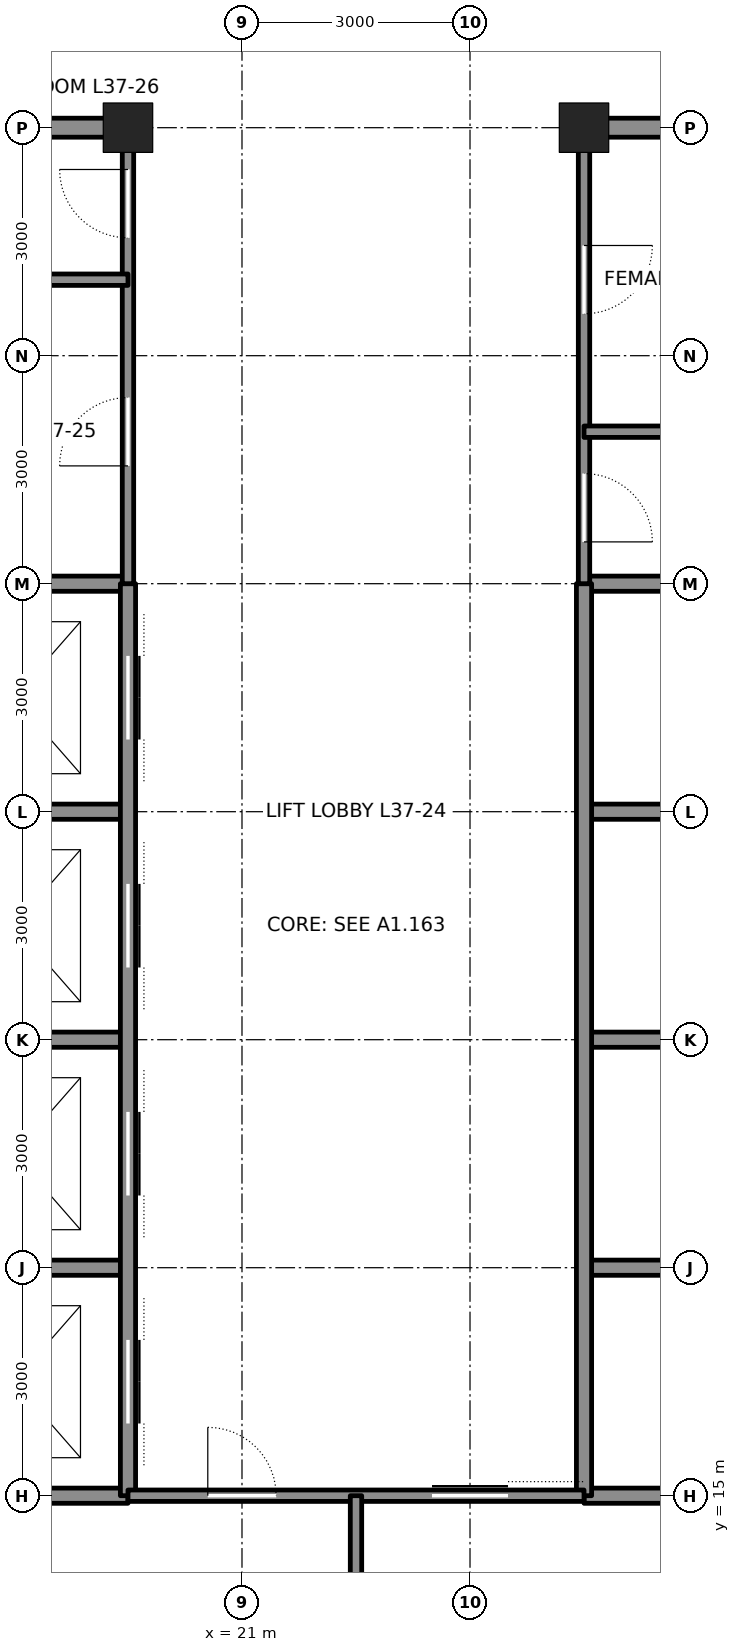
"""IFC4 building model, lengths in metres.
Left out: names, types, materials, properties, quantities, classifications, styles, units other than length and angle.
Written with IfcOpenShell. Run it as: python <this file> out.ifc"""

import sys

from ifc_helpers import new_model, si_unit, direction, frame, frame_2d, origin, origin_2d, place, context, subcontext, project, spatial, rectangle, hollow_rectangle, extrude, element, fill, save


model = new_model("IFC4")
c1 = context("Model", 3, precision=1e-05, world=origin(), true_north=direction((0.0, 1.0)))
c2 = subcontext(c1, "Body", "Model", "MODEL_VIEW")
j1 = project(units=[si_unit("LENGTHUNIT", "METRE"), si_unit("PLANEANGLEUNIT", "RADIAN")], contexts=[c1])
p1 = place(None, origin())
s1 = spatial("IfcSite", under=j1, at=p1, CompositionType="ELEMENT")
p2 = place(p1, origin())
s2 = spatial("IfcBuilding", under=s1, at=p2, CompositionType="ELEMENT")
p3 = place(p2, frame((0.0, 0.0, 169.8)))
s3 = spatial("IfcBuildingStorey", under=s2, at=p3, CompositionType="ELEMENT", Elevation=169.8)
for number, where, z_axis, x_axis in (
    (1, (19.5, 33.0, 0.0), (0.0, 0.0, 1.0), (1.0, 0.0, 0.0)),
    (2, (25.5, 33.0, 0.0), (0.0, 0.0, 1.0), (1.0, 0.0, 0.0)),
):
    element("IfcColumn", number, at=place(p3, frame(where, z_axis=z_axis, x_axis=x_axis)), inside=s3, PredefinedType="COLUMN", context=c2, shape_type="SweptSolid", body=[
        extrude(hollow_rectangle(XDim=0.65, YDim=0.65, WallThickness=0.065, at=origin_2d()), origin(), (0.0, 0.0, 1.0), 4.2),
    ])
for number, where, z_axis, x_axis in (
    (3, (12.0, 15.0, 0.0), (0.0, 0.0, 1.0), (1.0, 0.0, 0.0)),
    (4, (25.5, 15.0, 0.0), (0.0, 0.0, 1.0), (1.0, 0.0, 0.0)),
):
    element("IfcWall", number, at=place(p3, frame(where, z_axis=z_axis, x_axis=x_axis)), inside=s3, PredefinedType="SOLIDWALL", context=c2, shape_type="SweptSolid", body=[
        extrude(rectangle(XDim=7.5, YDim=0.2, at=frame_2d((3.75, 0.0))), origin(), (0.0, 0.0, 1.0), 4.04),
    ])
for number, where, z_axis, x_axis in (
    (5, (16.75, 24.0, 0.0), (0.0, 0.0, 1.0), (1.0, 0.0, 0.0)),
    (6, (25.5, 24.0, 0.0), (0.0, 0.0, 1.0), (1.0, 0.0, 0.0)),
):
    element("IfcWall", number, at=place(p3, frame(where, z_axis=z_axis, x_axis=x_axis)), inside=s3, PredefinedType="SOLIDWALL", context=c2, shape_type="SweptSolid", body=[
        extrude(rectangle(XDim=2.75, YDim=0.2, at=frame_2d((1.375, 0.0))), origin(), (0.0, 0.0, 1.0), 3.09),
    ])
p4 = place(p3, frame((12.0, 27.0, 0.0), z_axis=(0.0, 0.0, 1.0), x_axis=(1.0, 0.0, 0.0)))
e7 = element("IfcWall", 7, at=p4, inside=s3, PredefinedType="SOLIDWALL", context=c2, shape_type="SweptSolid", body=[
    extrude(rectangle(XDim=7.5, YDim=0.2, at=frame_2d((3.75, 0.0))), origin(), (0.0, 0.0, 1.0), 4.04),
])
p5 = place(p4, frame((1.65, 0.0, 0.0)))
e8 = element("IfcOpeningElement", 8, at=p5, cuts=e7, PredefinedType="OPENING", context=c2, shape_type="SweptSolid", body=[
    extrude(rectangle(XDim=1.2, YDim=2.1, at=frame_2d((0.6, 1.05))), frame((0.0, 0.11, 0.0), z_axis=(0.0, -1.0, 0.0), x_axis=(1.0, 0.0, 0.0)), (0.0, 0.0, 1.0), 0.22),
])
p6 = place(p3, frame((25.5, 27.0, 0.0), z_axis=(0.0, 0.0, 1.0), x_axis=(1.0, 0.0, 0.0)))
e9 = element("IfcWall", 9, at=p6, inside=s3, PredefinedType="SOLIDWALL", context=c2, shape_type="SweptSolid", body=[
    extrude(rectangle(XDim=3.0, YDim=0.2, at=frame_2d((1.5, 0.0))), origin(), (0.0, 0.0, 1.0), 4.04),
])
for number, where, z_axis, x_axis in (
    (10, (16.75, 33.0, 0.0), (0.0, 0.0, 1.0), (1.0, 0.0, 0.0)),
    (11, (25.75, 33.0, 0.0), (0.0, 0.0, 1.0), (1.0, 0.0, 0.0)),
):
    element("IfcWall", number, at=place(p3, frame(where, z_axis=z_axis, x_axis=x_axis)), inside=s3, PredefinedType="SOLIDWALL", context=c2, shape_type="SweptSolid", body=[
        extrude(rectangle(XDim=2.5, YDim=0.25, at=frame_2d((1.25, 0.0))), origin(), (0.0, 0.0, 1.0), 3.181),
    ])
p7 = place(p3, frame((16.5, 18.0, 0.0), z_axis=(0.0, 0.0, 1.0), x_axis=(1.0, 0.0, 0.0)))
e12 = element("IfcWall", 12, at=p7, inside=s3, PredefinedType="SOLIDWALL", context=c2, shape_type="SweptSolid", body=[
    extrude(rectangle(XDim=3.0, YDim=0.2, at=frame_2d((1.5, 0.0))), origin(), (0.0, 0.0, 1.0), 4.04),
])
p8 = place(p3, frame((25.5, 18.0, 0.0), z_axis=(0.0, 0.0, 1.0), x_axis=(1.0, 0.0, 0.0)))
e13 = element("IfcWall", 13, at=p8, inside=s3, PredefinedType="SOLIDWALL", context=c2, shape_type="SweptSolid", body=[
    extrude(rectangle(XDim=7.5, YDim=0.2, at=frame_2d((3.75, 0.0))), origin(), (0.0, 0.0, 1.0), 4.04),
])
p9 = place(p8, frame((4.65, 0.0, 0.0)))
e14 = element("IfcOpeningElement", 14, at=p9, cuts=e13, PredefinedType="OPENING", context=c2, shape_type="SweptSolid", body=[
    extrude(rectangle(XDim=1.2, YDim=2.1, at=frame_2d((0.6, 1.05))), frame((0.0, 0.11, 0.0), z_axis=(0.0, -1.0, 0.0), x_axis=(1.0, 0.0, 0.0)), (0.0, 0.0, 1.0), 0.22),
])
for number, where, z_axis, x_axis in (
    (15, (16.75, 21.0, 0.0), (0.0, 0.0, 1.0), (1.0, 0.0, 0.0)),
    (16, (25.5, 21.0, 0.0), (0.0, 0.0, 1.0), (1.0, 0.0, 0.0)),
):
    element("IfcWall", number, at=place(p3, frame(where, z_axis=z_axis, x_axis=x_axis)), inside=s3, PredefinedType="SOLIDWALL", context=c2, shape_type="SweptSolid", body=[
        extrude(rectangle(XDim=2.75, YDim=0.2, at=frame_2d((1.375, 0.0))), origin(), (0.0, 0.0, 1.0), 3.09),
    ])
p10 = place(p3, frame((19.5, 15.0, 0.0), z_axis=(0.0, 0.0, 1.0), x_axis=(0.0, 1.0, 0.0)))
e17 = element("IfcWall", 17, at=p10, inside=s3, PredefinedType="SOLIDWALL", context=c2, shape_type="SweptSolid", body=[
    extrude(rectangle(XDim=12.0, YDim=0.2, at=frame_2d((6.0, 0.0))), origin(), (0.0, 0.0, 1.0), 3.064),
])
p11 = place(p10, frame((0.95, 0.0, 0.0)))
e18 = element("IfcOpeningElement", 18, at=p11, cuts=e17, PredefinedType="OPENING", context=c2, shape_type="SweptSolid", body=[
    extrude(rectangle(XDim=1.1, YDim=2.1, at=frame_2d((0.55, 1.05))), frame((0.0, 0.11, 0.0), z_axis=(0.0, -1.0, 0.0), x_axis=(1.0, 0.0, 0.0)), (0.0, 0.0, 1.0), 0.22),
])
p12 = place(p10, frame((3.95, 0.0, 0.0)))
e19 = element("IfcOpeningElement", 19, at=p12, cuts=e17, PredefinedType="OPENING", context=c2, shape_type="SweptSolid", body=[
    extrude(rectangle(XDim=1.1, YDim=2.1, at=frame_2d((0.55, 1.05))), frame((0.0, 0.11, 0.0), z_axis=(0.0, -1.0, 0.0), x_axis=(1.0, 0.0, 0.0)), (0.0, 0.0, 1.0), 0.22),
])
p13 = place(p10, frame((6.95, 0.0, 0.0)))
e20 = element("IfcOpeningElement", 20, at=p13, cuts=e17, PredefinedType="OPENING", context=c2, shape_type="SweptSolid", body=[
    extrude(rectangle(XDim=1.1, YDim=2.1, at=frame_2d((0.55, 1.05))), frame((0.0, 0.11, 0.0), z_axis=(0.0, -1.0, 0.0), x_axis=(1.0, 0.0, 0.0)), (0.0, 0.0, 1.0), 0.22),
])
p14 = place(p10, frame((9.95, 0.0, 0.0)))
e21 = element("IfcOpeningElement", 21, at=p14, cuts=e17, PredefinedType="OPENING", context=c2, shape_type="SweptSolid", body=[
    extrude(rectangle(XDim=1.1, YDim=2.1, at=frame_2d((0.55, 1.05))), frame((0.0, 0.11, 0.0), z_axis=(0.0, -1.0, 0.0), x_axis=(1.0, 0.0, 0.0)), (0.0, 0.0, 1.0), 0.22),
])
p15 = place(p3, frame((19.5, 27.0, 0.0), z_axis=(0.0, 0.0, 1.0), x_axis=(0.0, 1.0, 0.0)))
e22 = element("IfcWall", 22, at=p15, inside=s3, PredefinedType="PARTITIONING", context=c2, shape_type="SweptSolid", body=[
    extrude(rectangle(XDim=5.75, YDim=0.15, at=frame_2d((2.875, 0.0))), origin(), (0.0, 0.0, 1.0), 3.064),
])
p16 = place(p15, frame((1.55, 0.0, 0.0)))
e23 = element("IfcOpeningElement", 23, at=p16, cuts=e22, PredefinedType="OPENING", context=c2, shape_type="SweptSolid", body=[
    extrude(rectangle(XDim=0.9, YDim=2.1, at=frame_2d((0.45, 1.05))), frame((0.0, 0.085, 0.0), z_axis=(0.0, -1.0, 0.0), x_axis=(1.0, 0.0, 0.0)), (0.0, 0.0, 1.0), 0.17),
])
p17 = place(p15, frame((4.55, 0.0, 0.0)))
e24 = element("IfcOpeningElement", 24, at=p17, cuts=e22, PredefinedType="OPENING", context=c2, shape_type="SweptSolid", body=[
    extrude(rectangle(XDim=0.9, YDim=2.1, at=frame_2d((0.45, 1.05))), frame((0.0, 0.085, 0.0), z_axis=(0.0, -1.0, 0.0), x_axis=(1.0, 0.0, 0.0)), (0.0, 0.0, 1.0), 0.17),
])
p18 = place(p3, frame((25.5, 15.0, 0.0), z_axis=(0.0, 0.0, 1.0), x_axis=(0.0, 1.0, 0.0)))
e25 = element("IfcWall", 25, at=p18, inside=s3, PredefinedType="SOLIDWALL", context=c2, shape_type="SweptSolid", body=[
    extrude(rectangle(XDim=12.0, YDim=0.2, at=frame_2d((6.0, 0.0))), origin(), (0.0, 0.0, 1.0), 3.064),
])
p19 = place(p3, frame((25.5, 27.0, 0.0), z_axis=(0.0, 0.0, 1.0), x_axis=(0.0, 1.0, 0.0)))
e26 = element("IfcWall", 26, at=p19, inside=s3, PredefinedType="PARTITIONING", context=c2, shape_type="SweptSolid", body=[
    extrude(rectangle(XDim=5.75, YDim=0.15, at=frame_2d((2.875, 0.0))), origin(), (0.0, 0.0, 1.0), 3.064),
])
p20 = place(p19, frame((0.55, 0.0, 0.0)))
e27 = element("IfcOpeningElement", 27, at=p20, cuts=e26, PredefinedType="OPENING", context=c2, shape_type="SweptSolid", body=[
    extrude(rectangle(XDim=0.9, YDim=2.1, at=frame_2d((0.45, 1.05))), frame((0.0, 0.085, 0.0), z_axis=(0.0, -1.0, 0.0), x_axis=(1.0, 0.0, 0.0)), (0.0, 0.0, 1.0), 0.17),
])
p21 = place(p19, frame((3.55, 0.0, 0.0)))
e28 = element("IfcOpeningElement", 28, at=p21, cuts=e26, PredefinedType="OPENING", context=c2, shape_type="SweptSolid", body=[
    extrude(rectangle(XDim=0.9, YDim=2.1, at=frame_2d((0.45, 1.05))), frame((0.0, 0.085, 0.0), z_axis=(0.0, -1.0, 0.0), x_axis=(1.0, 0.0, 0.0)), (0.0, 0.0, 1.0), 0.17),
])
p22 = place(p3, frame((19.5, 15.0, 0.0), z_axis=(0.0, 0.0, 1.0), x_axis=(1.0, 0.0, 0.0)))
e29 = element("IfcWall", 29, at=p22, inside=s3, PredefinedType="PARTITIONING", context=c2, shape_type="SweptSolid", body=[
    extrude(rectangle(XDim=6.0, YDim=0.15, at=frame_2d((3.0, 0.0))), origin(), (0.0, 0.0, 1.0), 4.04),
])
p23 = place(p22, frame((4.0, 0.0, 0.0)))
e30 = element("IfcOpeningElement", 30, at=p23, cuts=e29, PredefinedType="OPENING", context=c2, shape_type="SweptSolid", body=[
    extrude(rectangle(XDim=1.0, YDim=2.1, at=frame_2d((0.5, 1.05))), frame((0.0, 0.085, 0.0), z_axis=(0.0, -1.0, 0.0), x_axis=(1.0, 0.0, 0.0)), (0.0, 0.0, 1.0), 0.17),
])
p24 = place(p22, frame((1.05, 0.0, 0.0)))
e31 = element("IfcOpeningElement", 31, at=p24, cuts=e29, PredefinedType="OPENING", context=c2, shape_type="SweptSolid", body=[
    extrude(rectangle(XDim=0.9, YDim=2.1, at=frame_2d((0.45, 1.05))), frame((0.0, 0.085, 0.0), z_axis=(0.0, -1.0, 0.0), x_axis=(1.0, 0.0, 0.0)), (0.0, 0.0, 1.0), 0.17),
])
for number, where, z_axis, x_axis in (
    (32, (22.5, 15.0, 0.0), (0.0, 0.0, 1.0), (0.0, -1.0, 0.0)),
    (33, (16.5, 31.0, 0.0), (0.0, 0.0, 1.0), (1.0, 0.0, 0.0)),
    (34, (25.5, 29.0, 0.0), (0.0, 0.0, 1.0), (1.0, 0.0, 0.0)),
):
    element("IfcWall", number, at=place(p3, frame(where, z_axis=z_axis, x_axis=x_axis)), inside=s3, PredefinedType="PARTITIONING", context=c2, shape_type="SweptSolid", body=[
        extrude(rectangle(XDim=3.0, YDim=0.15, at=frame_2d((1.5, 0.0))), origin(), (0.0, 0.0, 1.0), 4.04),
    ])
p25 = place(p16, origin())
e35 = element("IfcDoor", 35, at=p25, inside=s3, OperationType="SINGLE_SWING_LEFT", PredefinedType="DOOR", context=c2, shape_type="SweptSolid", body=[
    extrude(rectangle(XDim=0.9, YDim=2.1, at=frame_2d((0.45, 1.05))), frame((0.0, 0.025, 0.0), z_axis=(0.0, -1.0, 0.0), x_axis=(1.0, 0.0, 0.0)), (0.0, 0.0, 1.0), 0.05),
])
fill(e23, e35)
p26 = place(p17, origin())
e36 = element("IfcDoor", 36, at=p26, inside=s3, OperationType="SINGLE_SWING_RIGHT", PredefinedType="DOOR", context=c2, shape_type="SweptSolid", body=[
    extrude(rectangle(XDim=0.9, YDim=2.1, at=frame_2d((0.45, 1.05))), frame((0.0, 0.025, 0.0), z_axis=(0.0, -1.0, 0.0), x_axis=(1.0, 0.0, 0.0)), (0.0, 0.0, 1.0), 0.05),
])
fill(e24, e36)
p27 = place(p20, frame((0.9, 0.0, 0.0), z_axis=(0.0, 0.0, 1.0), x_axis=(-1.0, 0.0, 0.0)))
e37 = element("IfcDoor", 37, at=p27, inside=s3, OperationType="SINGLE_SWING_RIGHT", PredefinedType="DOOR", context=c2, shape_type="SweptSolid", body=[
    extrude(rectangle(XDim=0.9, YDim=2.1, at=frame_2d((0.45, 1.05))), frame((0.0, 0.025, 0.0), z_axis=(0.0, -1.0, 0.0), x_axis=(1.0, 0.0, 0.0)), (0.0, 0.0, 1.0), 0.05),
])
fill(e27, e37)
p28 = place(p21, frame((0.9, 0.0, 0.0), z_axis=(0.0, 0.0, 1.0), x_axis=(-1.0, 0.0, 0.0)))
e38 = element("IfcDoor", 38, at=p28, inside=s3, OperationType="SINGLE_SWING_LEFT", PredefinedType="DOOR", context=c2, shape_type="SweptSolid", body=[
    extrude(rectangle(XDim=0.9, YDim=2.1, at=frame_2d((0.45, 1.05))), frame((0.0, 0.025, 0.0), z_axis=(0.0, -1.0, 0.0), x_axis=(1.0, 0.0, 0.0)), (0.0, 0.0, 1.0), 0.05),
])
fill(e28, e38)
p29 = place(p23, origin())
e39 = element("IfcDoor", 39, at=p29, inside=s3, OperationType="SLIDING_TO_LEFT", PredefinedType="DOOR", context=c2, shape_type="SweptSolid", body=[
    extrude(rectangle(XDim=1.0, YDim=2.1, at=frame_2d((0.5, 1.05))), frame((0.0, 0.025, 0.0), z_axis=(0.0, -1.0, 0.0), x_axis=(1.0, 0.0, 0.0)), (0.0, 0.0, 1.0), 0.05),
])
fill(e30, e39)
p30 = place(p24, origin())
e40 = element("IfcDoor", 40, at=p30, inside=s3, OperationType="SINGLE_SWING_LEFT", PredefinedType="DOOR", context=c2, shape_type="SweptSolid", body=[
    extrude(rectangle(XDim=0.9, YDim=2.1, at=frame_2d((0.45, 1.05))), frame((0.0, 0.025, 0.0), z_axis=(0.0, -1.0, 0.0), x_axis=(1.0, 0.0, 0.0)), (0.0, 0.0, 1.0), 0.05),
])
fill(e31, e40)
p31 = place(p11, origin())
e41 = element("IfcDoor", 41, at=p31, inside=s3, OperationType="DOUBLE_DOOR_SLIDING", PredefinedType="DOOR", context=c2, shape_type="SweptSolid", body=[
    extrude(rectangle(XDim=1.1, YDim=2.1, at=frame_2d((0.55, 1.05))), frame((0.0, 0.025, 0.0), z_axis=(0.0, -1.0, 0.0), x_axis=(1.0, 0.0, 0.0)), (0.0, 0.0, 1.0), 0.05),
])
fill(e18, e41)
p32 = place(p12, origin())
e42 = element("IfcDoor", 42, at=p32, inside=s3, OperationType="DOUBLE_DOOR_SLIDING", PredefinedType="DOOR", context=c2, shape_type="SweptSolid", body=[
    extrude(rectangle(XDim=1.1, YDim=2.1, at=frame_2d((0.55, 1.05))), frame((0.0, 0.025, 0.0), z_axis=(0.0, -1.0, 0.0), x_axis=(1.0, 0.0, 0.0)), (0.0, 0.0, 1.0), 0.05),
])
fill(e19, e42)
p33 = place(p13, origin())
e43 = element("IfcDoor", 43, at=p33, inside=s3, OperationType="DOUBLE_DOOR_SLIDING", PredefinedType="DOOR", context=c2, shape_type="SweptSolid", body=[
    extrude(rectangle(XDim=1.1, YDim=2.1, at=frame_2d((0.55, 1.05))), frame((0.0, 0.025, 0.0), z_axis=(0.0, -1.0, 0.0), x_axis=(1.0, 0.0, 0.0)), (0.0, 0.0, 1.0), 0.05),
])
fill(e20, e43)
p34 = place(p14, origin())
e44 = element("IfcDoor", 44, at=p34, inside=s3, OperationType="DOUBLE_DOOR_SLIDING", PredefinedType="DOOR", context=c2, shape_type="SweptSolid", body=[
    extrude(rectangle(XDim=1.1, YDim=2.1, at=frame_2d((0.55, 1.05))), frame((0.0, 0.025, 0.0), z_axis=(0.0, -1.0, 0.0), x_axis=(1.0, 0.0, 0.0)), (0.0, 0.0, 1.0), 0.05),
])
fill(e21, e44)
save(model, sys.argv[1])
